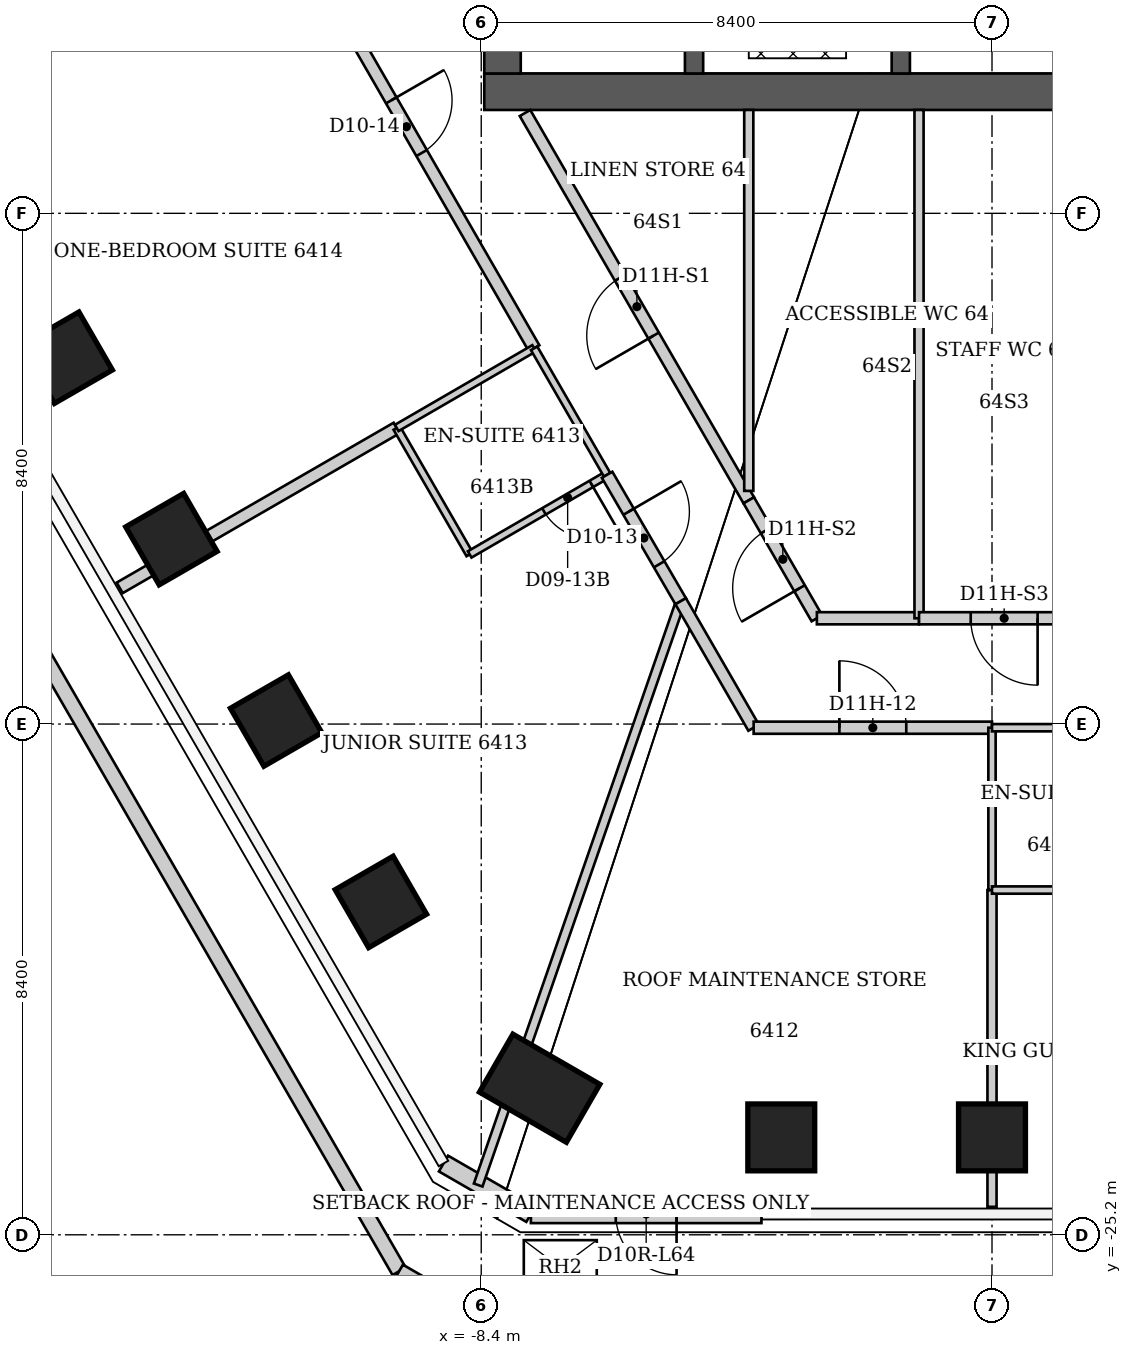
"""IFC4 building model, lengths in metres.
Left out: names, types, materials, properties, quantities, classifications, styles, units other than length and angle.
Written with IfcOpenShell. Run it as: python <this file> out.ifc"""

import sys

from ifc_helpers import new_model, si_unit, direction, frame, frame_2d, origin, origin_2d, place, context, subcontext, project, spatial, rectangle, extrude, clip, halfspace, element, fill, save


model = new_model("IFC4")
c1 = context("Model", 3, precision=1e-05, world=origin(), true_north=direction((0.0, 1.0)))
c2 = subcontext(c1, "Body", "Model", "MODEL_VIEW")
j1 = project(units=[si_unit("LENGTHUNIT", "METRE"), si_unit("PLANEANGLEUNIT", "RADIAN")], contexts=[c1])
p1 = place(None, origin())
s1 = spatial("IfcSite", under=j1, at=p1, CompositionType="ELEMENT")
p2 = place(p1, origin())
s2 = spatial("IfcBuilding", under=s1, at=p2, CompositionType="ELEMENT")
p3 = place(p2, frame((0.0, 0.0, 257.0)))
s3 = spatial("IfcBuildingStorey", under=s2, at=p3, CompositionType="ELEMENT", Elevation=257.0)
p4 = place(p3, frame((0.0, -23.598, -0.051), z_axis=(0.0, 0.0, 1.0), x_axis=(0.0, -1.0, 0.0)))
e1 = element("IfcColumn", 1, at=p4, inside=s3, PredefinedType="COLUMN", context=c2, shape_type="SweptSolid", body=[
    clip(extrude(rectangle(XDim=1.1, YDim=1.1, at=origin_2d()), origin(), (0.0, 0.0, 1.0), 3.851), halfspace(frame((0.0, 0.0, 0.051)), True)),
])
p5 = place(p3, frame((-3.466, -23.598, -0.059), z_axis=(0.0, 0.0, 1.0), x_axis=(0.0, -1.0, 0.0)))
e2 = element("IfcColumn", 2, at=p5, inside=s3, PredefinedType="COLUMN", context=c2, shape_type="SweptSolid", body=[
    clip(extrude(rectangle(XDim=1.1, YDim=1.1, at=origin_2d()), origin(), (0.0, 0.0, 1.0), 3.859), halfspace(frame((0.0, 0.0, 0.059)), True)),
])
p6 = place(p3, frame((-7.439, -22.79, -0.069), z_axis=(0.0, 0.0, 1.0), x_axis=(-0.5, -0.866025403784, 0.0)))
e3 = element("IfcColumn", 3, at=p6, inside=s3, PredefinedType="COLUMN", context=c2, shape_type="SweptSolid", body=[
    clip(extrude(rectangle(XDim=1.1, YDim=1.65, at=origin_2d()), origin(), (0.0, 0.0, 1.0), 3.869), halfspace(frame((0.0, 0.0, 0.069)), True)),
])
p7 = place(p3, frame((-10.05, -19.725, -0.067), z_axis=(0.0, 0.0, 1.0), x_axis=(-0.866025403784, -0.5, 0.0)))
e4 = element("IfcColumn", 4, at=p7, inside=s3, PredefinedType="COLUMN", context=c2, shape_type="SweptSolid", body=[
    clip(extrude(rectangle(XDim=1.1, YDim=1.1, at=origin_2d()), origin(), (0.0, 0.0, 1.0), 3.867), halfspace(frame((0.0, 0.0, 0.067)), True)),
])
p8 = place(p3, frame((-11.773, -16.742, -0.06), z_axis=(0.0, 0.0, 1.0), x_axis=(-0.866025403784, -0.5, 0.0)))
e5 = element("IfcColumn", 5, at=p8, inside=s3, PredefinedType="COLUMN", context=c2, shape_type="SweptSolid", body=[
    clip(extrude(rectangle(XDim=1.1, YDim=1.1, at=origin_2d()), origin(), (0.0, 0.0, 1.0), 3.86), halfspace(frame((0.0, 0.0, 0.06)), True)),
])
p9 = place(p3, frame((-13.495, -13.759, -0.052), z_axis=(0.0, 0.0, 1.0), x_axis=(-0.866025403784, -0.5, 0.0)))
e6 = element("IfcColumn", 6, at=p9, inside=s3, PredefinedType="COLUMN", context=c2, shape_type="SweptSolid", body=[
    clip(extrude(rectangle(XDim=1.1, YDim=1.1, at=origin_2d()), origin(), (0.0, 0.0, 1.0), 3.852), halfspace(frame((0.0, 0.0, 0.052)), True)),
])
p10 = place(p3, frame((-15.218, -10.775, -0.045), z_axis=(0.0, 0.0, 1.0), x_axis=(-0.866025403784, -0.5, 0.0)))
e7 = element("IfcColumn", 7, at=p10, inside=s3, PredefinedType="COLUMN", context=c2, shape_type="SweptSolid", body=[
    clip(extrude(rectangle(XDim=1.1, YDim=1.1, at=origin_2d()), origin(), (0.0, 0.0, 1.0), 3.845), halfspace(frame((0.0, 0.0, 0.045)), True)),
])
p11 = place(p3, frame((-8.35, -6.4, 0.0), z_axis=(0.0, 0.0, 1.0), x_axis=(1.0, 0.0, 0.0)))
e8 = element("IfcWall", 8, at=p11, inside=s3, PredefinedType="SHEAR", context=c2, shape_type="SweptSolid", body=[
    extrude(rectangle(XDim=16.7, YDim=0.6, at=frame_2d((8.35, 0.0))), origin(), (0.0, 0.0, 1.0), 3.8),
])
p12 = place(p3, frame((-8.05, -6.1, 0.0), z_axis=(0.0, 0.0, 1.0), x_axis=(0.0, 1.0, 0.0)))
e9 = element("IfcWall", 9, at=p12, inside=s3, PredefinedType="SHEAR", context=c2, shape_type="SweptSolid", body=[
    extrude(rectangle(XDim=12.2, YDim=0.6, at=frame_2d((6.1, 0.0))), origin(), (0.0, 0.0, 1.0), 3.8),
])
p13 = place(p12, frame((7.6, 0.0, 0.0)))
e10 = element("IfcOpeningElement", 10, at=p13, cuts=e9, PredefinedType="OPENING", context=c2, shape_type="SweptSolid", body=[
    extrude(rectangle(XDim=1.2, YDim=2.2, at=frame_2d((0.6, 1.1))), frame((0.0, 0.3, 0.0), z_axis=(0.0, -1.0, 0.0), x_axis=(1.0, 0.0, 0.0)), (0.0, 0.0, 1.0), 0.6),
])
for number, where, z_axis, x_axis in (
    (11, (-4.9, -6.1, 0.0), (0.0, 0.0, 1.0), (0.0, 1.0, 0.0)),
    (12, (-1.5, -6.1, 0.0), (0.0, 0.0, 1.0), (0.0, 1.0, 0.0)),
):
    element("IfcWall", number, at=place(p3, frame(where, z_axis=z_axis, x_axis=x_axis)), inside=s3, PredefinedType="SHEAR", context=c2, shape_type="SweptSolid", body=[
        extrude(rectangle(XDim=7.2, YDim=0.3, at=frame_2d((3.6, 0.0))), origin(), (0.0, 0.0, 1.0), 3.8),
    ])
p14 = place(p3, frame((-3.792, -24.858, 0.0), z_axis=(0.0, 0.0, 1.0), x_axis=(-1.0, 0.0, 0.0)))
e13 = element("IfcWall", 13, at=p14, inside=s3, PredefinedType="SOLIDWALL", context=c2, shape_type="SweptSolid", body=[
    extrude(rectangle(XDim=3.792, YDim=0.3, at=frame_2d((1.896, 0.0))), origin(), (0.0, 0.0, 1.0), 3.64),
])
p15 = place(p14, frame((1.396, 0.0, 0.0)))
e14 = element("IfcOpeningElement", 14, at=p15, cuts=e13, PredefinedType="OPENING", context=c2, shape_type="SweptSolid", body=[
    extrude(rectangle(XDim=1.0, YDim=2.2, at=frame_2d((0.5, 1.1))), frame((0.0, 0.15, 0.0), z_axis=(0.0, -1.0, 0.0), x_axis=(1.0, 0.0, 0.0)), (0.0, 0.0, 1.0), 0.3),
])
p16 = place(p3, frame((-7.583, -24.858, 0.0), z_axis=(0.0, 0.0, 1.0), x_axis=(-0.865989634427, 0.500061949227, 0.0)))
e15 = element("IfcWall", 15, at=p16, inside=s3, PredefinedType="SOLIDWALL", context=c2, shape_type="SweptSolid", body=[
    extrude(rectangle(XDim=1.66, YDim=0.3, at=frame_2d((0.83, 0.0))), origin(), (0.0, 0.0, 1.0), 3.64),
])
p17 = place(p3, frame((-27.219, 4.456, 0.0), z_axis=(0.0, 0.0, 1.0), x_axis=(0.499998496786, -0.866026271663, 0.0)))
e16 = element("IfcWall", 16, at=p17, inside=s3, PredefinedType="PARAPET", context=c2, shape_type="SweptSolid", body=[
    extrude(rectangle(XDim=34.936, YDim=0.25, at=frame_2d((17.468, 0.0))), origin(), (0.0, 0.0, 1.0), 1.1),
])
p18 = place(p3, frame((-9.75, -25.8, 0.0), z_axis=(0.0, 0.0, 1.0), x_axis=(0.865508535391, -0.500894175615, 0.0)))
e17 = element("IfcWall", 17, at=p18, inside=s3, PredefinedType="PARAPET", context=c2, shape_type="SweptSolid", body=[
    extrude(rectangle(XDim=1.761, YDim=0.25, at=frame_2d((0.88, 0.0))), origin(), (0.0, 0.0, 1.0), 1.1),
])
p19 = place(p3, frame((-14.346, -14.56, 0.0), z_axis=(0.0, 0.0, 1.0), x_axis=(0.8660557602, 0.49994741746, 0.0)))
e18 = element("IfcWall", 18, at=p19, inside=s3, PredefinedType="PARTITIONING", context=c2, shape_type="SweptSolid", body=[
    extrude(rectangle(XDim=5.261, YDim=0.2, at=frame_2d((2.63, 0.0))), origin(), (0.0, 0.0, 1.0), 3.64),
])
p20 = place(p3, frame((-11.73, -3.33, 0.0), z_axis=(0.0, 0.0, 1.0), x_axis=(0.499214067722, -0.866478686748, 0.0)))
e19 = element("IfcWall", 19, at=p20, inside=s3, PredefinedType="PARTITIONING", context=c2, shape_type="SweptSolid", body=[
    extrude(rectangle(XDim=8.413, YDim=0.2, at=frame_2d((4.207, 0.0))), origin(), (0.0, 0.0, 1.0), 3.64),
])
p21 = place(p20, frame((3.707, 0.0, 0.0)))
e20 = element("IfcOpeningElement", 20, at=p21, cuts=e19, PredefinedType="OPENING", context=c2, shape_type="SweptSolid", body=[
    extrude(rectangle(XDim=1.0, YDim=2.13, at=frame_2d((0.5, 1.065))), frame((0.0, 0.1, 0.0), z_axis=(0.0, -1.0, 0.0), x_axis=(1.0, 0.0, 0.0)), (0.0, 0.0, 1.0), 0.2),
])
p22 = place(p3, frame((-9.79, -11.93, 0.0), z_axis=(0.0, 0.0, 1.0), x_axis=(0.499693115345, -0.866202511239, 0.0)))
e21 = element("IfcWall", 21, at=p22, inside=s3, PredefinedType="PARTITIONING", context=c2, shape_type="SweptSolid", body=[
    extrude(rectangle(XDim=2.401, YDim=0.12, at=frame_2d((1.201, 0.0))), origin(), (0.0, 0.0, 1.0), 3.64),
])
p23 = place(p3, frame((-9.79, -11.93, 0.0), z_axis=(0.0, 0.0, 1.0), x_axis=(0.865195830568, 0.501434118073, 0.0)))
e22 = element("IfcWall", 22, at=p23, inside=s3, PredefinedType="PARTITIONING", context=c2, shape_type="SweptSolid", body=[
    extrude(rectangle(XDim=2.612, YDim=0.12, at=frame_2d((1.306, 0.0))), origin(), (0.0, 0.0, 1.0), 3.64),
])
p24 = place(p3, frame((-8.59, -14.01, 0.0), z_axis=(0.0, 0.0, 1.0), x_axis=(0.865155281359, 0.50150407689, 0.0)))
e23 = element("IfcWall", 23, at=p24, inside=s3, PredefinedType="PARTITIONING", context=c2, shape_type="SweptSolid", body=[
    extrude(rectangle(XDim=2.612, YDim=0.12, at=frame_2d((1.306, 0.0))), origin(), (0.0, 0.0, 1.0), 3.64),
])
p25 = place(p24, frame((1.412, 0.0, 0.0)))
e24 = element("IfcOpeningElement", 24, at=p25, cuts=e23, PredefinedType="OPENING", context=c2, shape_type="SweptSolid", body=[
    extrude(rectangle(XDim=0.9, YDim=2.03, at=frame_2d((0.45, 1.015))), frame((0.0, 0.06, 0.0), z_axis=(0.0, -1.0, 0.0), x_axis=(1.0, 0.0, 0.0)), (0.0, 0.0, 1.0), 0.12),
])
p26 = place(p3, frame((-8.45, -24.382, 0.0), z_axis=(0.0, 0.0, 1.0), x_axis=(0.327680470733, 0.944788605509, 0.0)))
e25 = element("IfcWall", 25, at=p26, inside=s3, PredefinedType="PARTITIONING", context=c2, shape_type="SweptSolid", body=[
    extrude(rectangle(XDim=10.078, YDim=0.15, at=frame_2d((5.039, 0.0))), origin(), (0.0, 0.0, 1.0), 3.64),
])
p27 = place(p3, frame((-7.53, -10.62, 0.0), z_axis=(0.0, 0.0, 1.0), x_axis=(0.499737123639, -0.866177122335, 0.0)))
e26 = element("IfcWall", 26, at=p27, inside=s3, PredefinedType="PARTITIONING", context=c2, shape_type="SweptSolid", body=[
    extrude(rectangle(XDim=2.401, YDim=0.12, at=frame_2d((1.201, 0.0))), origin(), (0.0, 0.0, 1.0), 3.64),
])
p28 = place(p3, frame((-6.33, -12.7, 0.0), z_axis=(0.0, 0.0, 1.0), x_axis=(0.502810888564, -0.864396442809, 0.0)))
e27 = element("IfcWall", 27, at=p28, inside=s3, PredefinedType="PARTITIONING", context=c2, shape_type="SweptSolid", body=[
    extrude(rectangle(XDim=2.406, YDim=0.2, at=frame_2d((1.203, 0.0))), origin(), (0.0, 0.0, 1.0), 3.64),
])
p29 = place(p28, frame((0.703, 0.0, 0.0)))
e28 = element("IfcOpeningElement", 28, at=p29, cuts=e27, PredefinedType="OPENING", context=c2, shape_type="SweptSolid", body=[
    extrude(rectangle(XDim=1.0, YDim=2.13, at=frame_2d((0.5, 1.065))), frame((0.0, 0.1, 0.0), z_axis=(0.0, -1.0, 0.0), x_axis=(1.0, 0.0, 0.0)), (0.0, 0.0, 1.0), 0.2),
])
p30 = place(p3, frame((-5.12, -14.78, 0.0), z_axis=(0.0, 0.0, 1.0), x_axis=(0.499813401482, -0.866133109688, 0.0)))
e29 = element("IfcWall", 29, at=p30, inside=s3, PredefinedType="PARTITIONING", context=c2, shape_type="SweptSolid", body=[
    extrude(rectangle(XDim=2.401, YDim=0.2, at=frame_2d((1.201, 0.0))), origin(), (0.0, 0.0, 1.0), 3.64),
])
p31 = place(p3, frame((-4.0, -13.12, 0.0), z_axis=(0.0, 0.0, 1.0), x_axis=(-0.500218436225, 0.865899252835, 0.0)))
e30 = element("IfcWall", 30, at=p31, inside=s3, PredefinedType="PARTITIONING", context=c2, shape_type="SweptSolid", body=[
    extrude(rectangle(XDim=7.357, YDim=0.2, at=frame_2d((3.678, 0.0))), origin(), (0.0, 0.0, 1.0), 3.64),
])
p32 = place(p31, frame((3.128, 0.0, 0.0)))
e31 = element("IfcOpeningElement", 31, at=p32, cuts=e30, PredefinedType="OPENING", context=c2, shape_type="SweptSolid", body=[
    extrude(rectangle(XDim=1.1, YDim=2.2, at=frame_2d((0.55, 1.1))), frame((0.0, 0.1, 0.0), z_axis=(0.0, -1.0, 0.0), x_axis=(1.0, 0.0, 0.0)), (0.0, 0.0, 1.0), 0.2),
])
p33 = place(p3, frame((-4.0, -6.7, 0.0), z_axis=(0.0, 0.0, 1.0), x_axis=(0.0, -1.0, 0.0)))
e32 = element("IfcWall", 32, at=p33, inside=s3, PredefinedType="PARTITIONING", context=c2, shape_type="SweptSolid", body=[
    extrude(rectangle(XDim=6.265, YDim=0.15, at=frame_2d((3.133, 0.0))), origin(), (0.0, 0.0, 1.0), 3.64),
])
p34 = place(p3, frame((-3.92, -16.86, 0.0), z_axis=(0.0, 0.0, 1.0), x_axis=(1.0, 0.0, 0.0)))
e33 = element("IfcWall", 33, at=p34, inside=s3, PredefinedType="PARTITIONING", context=c2, shape_type="SweptSolid", body=[
    extrude(rectangle(XDim=3.92, YDim=0.2, at=frame_2d((1.96, 0.0))), origin(), (0.0, 0.0, 1.0), 3.64),
])
p35 = place(p34, frame((1.41, 0.0, 0.0)))
e34 = element("IfcOpeningElement", 34, at=p35, cuts=e33, PredefinedType="OPENING", context=c2, shape_type="SweptSolid", body=[
    extrude(rectangle(XDim=1.1, YDim=2.2, at=frame_2d((0.55, 1.1))), frame((0.0, 0.1, 0.0), z_axis=(0.0, -1.0, 0.0), x_axis=(1.0, 0.0, 0.0)), (0.0, 0.0, 1.0), 0.2),
])
p36 = place(p3, frame((-2.88, -15.06, 0.0), z_axis=(0.0, 0.0, 1.0), x_axis=(-0.499983441833, 0.866034963436, 0.0)))
e35 = element("IfcWall", 35, at=p36, inside=s3, PredefinedType="PARTITIONING", context=c2, shape_type="SweptSolid", body=[
    extrude(rectangle(XDim=2.24, YDim=0.2, at=frame_2d((1.12, 0.0))), origin(), (0.0, 0.0, 1.0), 3.64),
])
p37 = place(p36, frame((0.57, 0.0, 0.0)))
e36 = element("IfcOpeningElement", 36, at=p37, cuts=e35, PredefinedType="OPENING", context=c2, shape_type="SweptSolid", body=[
    extrude(rectangle(XDim=1.1, YDim=2.2, at=frame_2d((0.55, 1.1))), frame((0.0, 0.1, 0.0), z_axis=(0.0, -1.0, 0.0), x_axis=(1.0, 0.0, 0.0)), (0.0, 0.0, 1.0), 0.2),
])
p38 = place(p3, frame((-1.2, -15.06, 0.0), z_axis=(0.0, 0.0, 1.0), x_axis=(-1.0, 0.0, 0.0)))
e37 = element("IfcWall", 37, at=p38, inside=s3, PredefinedType="PARTITIONING", context=c2, shape_type="SweptSolid", body=[
    extrude(rectangle(XDim=1.68, YDim=0.2, at=frame_2d((0.84, 0.0))), origin(), (0.0, 0.0, 1.0), 3.64),
])
p39 = place(p3, frame((-1.2, -6.7, 0.0), z_axis=(0.0, 0.0, 1.0), x_axis=(0.0, -1.0, 0.0)))
e38 = element("IfcWall", 38, at=p39, inside=s3, PredefinedType="PARTITIONING", context=c2, shape_type="SweptSolid", body=[
    extrude(rectangle(XDim=8.36, YDim=0.15, at=frame_2d((4.18, 0.0))), origin(), (0.0, 0.0, 1.0), 3.64),
])
p40 = place(p3, frame((0.0, -24.74, 0.0), z_axis=(0.0, 0.0, 1.0), x_axis=(0.0, 1.0, 0.0)))
e39 = element("IfcWall", 39, at=p40, inside=s3, PredefinedType="PARTITIONING", context=c2, shape_type="SweptSolid", body=[
    extrude(rectangle(XDim=5.21, YDim=0.15, at=frame_2d((2.605, 0.0))), origin(), (0.0, 0.0, 1.0), 2.86),
])
p41 = place(p3, frame((0.0, -19.53, 0.0), z_axis=(0.0, 0.0, 1.0), x_axis=(0.0, 1.0, 0.0)))
e40 = element("IfcWall", 40, at=p41, inside=s3, PredefinedType="PARTITIONING", context=c2, shape_type="SweptSolid", body=[
    extrude(rectangle(XDim=2.67, YDim=0.12, at=frame_2d((1.335, 0.0))), origin(), (0.0, 0.0, 1.0), 2.86),
])
for number, where, z_axis, x_axis in (
    (41, (0.0, -19.53, 0.0), (0.0, 0.0, 1.0), (1.0, 0.0, 0.0)),
    (42, (0.0, -16.86, 0.0), (0.0, 0.0, 1.0), (1.0, 0.0, 0.0)),
):
    element("IfcWall", number, at=place(p3, frame(where, z_axis=z_axis, x_axis=x_axis)), inside=s3, PredefinedType="PARTITIONING", context=c2, shape_type="SweptSolid", body=[
        extrude(rectangle(XDim=2.45, YDim=0.12, at=frame_2d((1.225, 0.0))), origin(), (0.0, 0.0, 1.0), 3.64),
    ])
p42 = place(p3, frame((1.6, -15.06, 0.0), z_axis=(0.0, 0.0, 1.0), x_axis=(-1.0, 0.0, 0.0)))
e43 = element("IfcWall", 43, at=p42, inside=s3, PredefinedType="PARTITIONING", context=c2, shape_type="SweptSolid", body=[
    extrude(rectangle(XDim=2.8, YDim=0.2, at=frame_2d((1.4, 0.0))), origin(), (0.0, 0.0, 1.0), 3.64),
])
p43 = place(p42, frame((0.85, 0.0, 0.0)))
e44 = element("IfcOpeningElement", 44, at=p43, cuts=e43, PredefinedType="OPENING", context=c2, shape_type="SweptSolid", body=[
    extrude(rectangle(XDim=1.1, YDim=2.2, at=frame_2d((0.55, 1.1))), frame((0.0, 0.1, 0.0), z_axis=(0.0, -1.0, 0.0), x_axis=(1.0, 0.0, 0.0)), (0.0, 0.0, 1.0), 0.2),
])
p44 = place(p15, origin())
e45 = element("IfcDoor", 45, at=p44, inside=s3, OperationType="SINGLE_SWING_LEFT", PredefinedType="DOOR", context=c2, shape_type="SweptSolid", body=[
    extrude(rectangle(XDim=1.0, YDim=2.2, at=frame_2d((0.5, 1.1))), frame((0.0, 0.025, 0.0), z_axis=(0.0, -1.0, 0.0), x_axis=(1.0, 0.0, 0.0)), (0.0, 0.0, 1.0), 0.05),
])
fill(e14, e45)
p45 = place(p3, frame((0.0, 0.0, -0.2)))
p46 = place(p45, frame((-7.1, -25.738, 0.0)))
p47 = place(p46, frame((0.0, 0.0, 0.15)))
e46 = element("IfcWindow", 46, at=p47, inside=s3, PartitioningType="SINGLE_PANEL", PredefinedType="SKYLIGHT", context=c2, shape_type="SweptSolid", body=[
    extrude(rectangle(XDim=1.2, YDim=0.9, at=origin_2d()), origin(), (0.0, 0.0, 1.0), 0.05),
])
p48 = place(p35, origin())
e47 = element("IfcDoor", 47, at=p48, inside=s3, OperationType="SINGLE_SWING_LEFT", PredefinedType="DOOR", context=c2, shape_type="SweptSolid", body=[
    extrude(rectangle(XDim=1.1, YDim=2.2, at=frame_2d((0.55, 1.1))), frame((0.0, 0.025, 0.0), z_axis=(0.0, -1.0, 0.0), x_axis=(1.0, 0.0, 0.0)), (0.0, 0.0, 1.0), 0.05),
])
fill(e34, e47)
p49 = place(p29, origin())
e48 = element("IfcDoor", 48, at=p49, inside=s3, OperationType="SINGLE_SWING_LEFT", PredefinedType="DOOR", context=c2, shape_type="SweptSolid", body=[
    extrude(rectangle(XDim=1.0, YDim=2.13, at=frame_2d((0.5, 1.065))), frame((0.0, 0.025, 0.0), z_axis=(0.0, -1.0, 0.0), x_axis=(1.0, 0.0, 0.0)), (0.0, 0.0, 1.0), 0.05),
])
fill(e28, e48)
p50 = place(p25, origin())
e49 = element("IfcDoor", 49, at=p50, inside=s3, OperationType="SINGLE_SWING_RIGHT", PredefinedType="DOOR", context=c2, shape_type="SweptSolid", body=[
    extrude(rectangle(XDim=0.9, YDim=2.03, at=frame_2d((0.45, 1.015))), frame((0.0, 0.025, 0.0), z_axis=(0.0, -1.0, 0.0), x_axis=(1.0, 0.0, 0.0)), (0.0, 0.0, 1.0), 0.05),
])
fill(e24, e49)
p51 = place(p21, origin())
e50 = element("IfcDoor", 50, at=p51, inside=s3, OperationType="SINGLE_SWING_LEFT", PredefinedType="DOOR", context=c2, shape_type="SweptSolid", body=[
    extrude(rectangle(XDim=1.0, YDim=2.13, at=frame_2d((0.5, 1.065))), frame((0.0, 0.025, 0.0), z_axis=(0.0, -1.0, 0.0), x_axis=(1.0, 0.0, 0.0)), (0.0, 0.0, 1.0), 0.05),
])
fill(e20, e50)
p52 = place(p32, origin())
e51 = element("IfcDoor", 51, at=p52, inside=s3, OperationType="SINGLE_SWING_LEFT", PredefinedType="DOOR", context=c2, shape_type="SweptSolid", body=[
    extrude(rectangle(XDim=1.1, YDim=2.2, at=frame_2d((0.55, 1.1))), frame((0.0, 0.025, 0.0), z_axis=(0.0, -1.0, 0.0), x_axis=(1.0, 0.0, 0.0)), (0.0, 0.0, 1.0), 0.05),
])
fill(e31, e51)
p53 = place(p37, origin())
e52 = element("IfcDoor", 52, at=p53, inside=s3, OperationType="SINGLE_SWING_LEFT", PredefinedType="DOOR", context=c2, shape_type="SweptSolid", body=[
    extrude(rectangle(XDim=1.1, YDim=2.2, at=frame_2d((0.55, 1.1))), frame((0.0, 0.025, 0.0), z_axis=(0.0, -1.0, 0.0), x_axis=(1.0, 0.0, 0.0)), (0.0, 0.0, 1.0), 0.05),
])
fill(e36, e52)
p54 = place(p43, origin())
e53 = element("IfcDoor", 53, at=p54, inside=s3, OperationType="SINGLE_SWING_LEFT", PredefinedType="DOOR", context=c2, shape_type="SweptSolid", body=[
    extrude(rectangle(XDim=1.1, YDim=2.2, at=frame_2d((0.55, 1.1))), frame((0.0, 0.025, 0.0), z_axis=(0.0, -1.0, 0.0), x_axis=(1.0, 0.0, 0.0)), (0.0, 0.0, 1.0), 0.05),
])
fill(e44, e53)
save(model, sys.argv[1])
